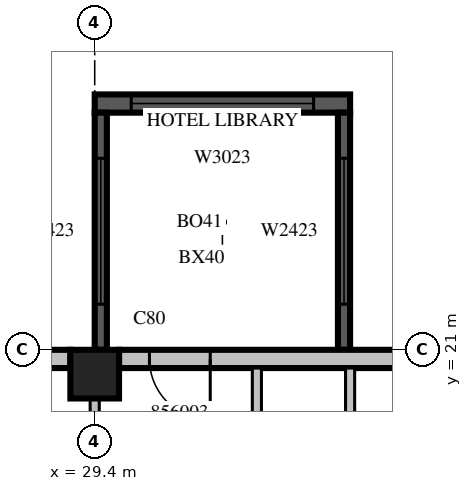
"""IFC4 building model, lengths in metres.
Left out: names, types, materials, properties, quantities, classifications, styles, units other than length and angle.
Written with IfcOpenShell. Run it as: python <this file> out.ifc"""

import sys

from ifc_helpers import new_model, si_unit, direction, frame, frame_2d, origin, origin_2d, place, context, subcontext, project, spatial, rectangle, extrude, source, transform, mapped, element, fill, save


model = new_model("IFC4")
c1 = context("Model", 3, precision=1e-05, world=origin(), true_north=direction((0.0, 1.0)))
c2 = subcontext(c1, "Body", "Model", "MODEL_VIEW")
j1 = project(units=[si_unit("LENGTHUNIT", "METRE"), si_unit("PLANEANGLEUNIT", "RADIAN")], contexts=[c1])
p1 = place(None, origin())
s1 = spatial("IfcSite", under=j1, at=p1, CompositionType="ELEMENT")
p2 = place(p1, origin())
s2 = spatial("IfcBuilding", under=s1, at=p2, CompositionType="ELEMENT")
p3 = place(p2, frame((0.0, 0.0, 246.2)))
s3 = spatial("IfcBuildingStorey", under=s2, at=p3, CompositionType="ELEMENT", Elevation=246.2)
m1 = source(origin(), c2, "Body", "SweptSolid", [
    extrude(rectangle(XDim=0.8, YDim=0.8, at=origin_2d()), origin(), (0.0, 0.0, 1.0), 3.8),
])
p4 = place(p3, frame((29.4, 20.6, 0.0), z_axis=(0.0, 0.0, 1.0), x_axis=(1.0, 0.0, 0.0)))
e1 = element("IfcColumn", 1, at=p4, inside=s3, PredefinedType="COLUMN", context=c2, shape_type="MappedRepresentation", body=[
    mapped(m1, transform((0.0, 0.0, 0.0), scale=1.0)),
])
m2 = source(origin(), c2, "Body", "SweptSolid", [
    extrude(rectangle(XDim=4.2, YDim=0.3, at=frame_2d((2.1, 0.0))), origin(), (0.0, 0.0, 1.0), 3.4),
])
p5 = place(p3, frame((33.6, 25.05, 0.0), z_axis=(0.0, 0.0, 1.0), x_axis=(-1.0, 0.0, 0.0)))
e2 = element("IfcWall", 2, at=p5, inside=s3, PredefinedType="SOLIDWALL", context=c2, shape_type="MappedRepresentation", body=[
    mapped(m2, transform((0.0, 0.0, 0.0), scale=1.0)),
])
m3 = source(origin(), c2, "Body", "SweptSolid", [
    extrude(rectangle(XDim=3.0, YDim=2.3, at=frame_2d((1.5, 1.15))), frame((0.0, 0.16, 0.0), z_axis=(0.0, -1.0, 0.0), x_axis=(1.0, 0.0, 0.0)), (0.0, 0.0, 1.0), 0.32),
])
p6 = place(p5, frame((0.6, 0.0, 0.6)))
e3 = element("IfcOpeningElement", 3, at=p6, cuts=e2, PredefinedType="OPENING", context=c2, shape_type="MappedRepresentation", body=[
    mapped(m3, transform((0.0, 0.0, 0.0), scale=1.0)),
])
m4 = source(origin(), c2, "Body", "SweptSolid", [
    extrude(rectangle(XDim=3.9, YDim=0.2, at=frame_2d((1.95, 0.0))), origin(), (0.0, 0.0, 1.0), 3.4),
])
p7 = place(p3, frame((33.5, 21.0, 0.0), z_axis=(0.0, 0.0, 1.0), x_axis=(0.0, 1.0, 0.0)))
e4 = element("IfcWall", 4, at=p7, inside=s3, PredefinedType="SOLIDWALL", context=c2, shape_type="MappedRepresentation", body=[
    mapped(m4, transform((0.0, 0.0, 0.0), scale=1.0)),
])
m5 = source(origin(), c2, "Body", "SweptSolid", [
    extrude(rectangle(XDim=2.4, YDim=2.3, at=frame_2d((1.2, 1.15))), frame((0.0, 0.11, 0.0), z_axis=(0.0, -1.0, 0.0), x_axis=(1.0, 0.0, 0.0)), (0.0, 0.0, 1.0), 0.22),
])
p8 = place(p7, frame((0.75, 0.0, 0.6)))
e5 = element("IfcOpeningElement", 5, at=p8, cuts=e4, PredefinedType="OPENING", context=c2, shape_type="MappedRepresentation", body=[
    mapped(m5, transform((0.0, 0.0, 0.0), scale=1.0)),
])
p9 = place(p3, frame((29.5, 21.0, 0.0), z_axis=(0.0, 0.0, 1.0), x_axis=(0.0, 1.0, 0.0)))
e6 = element("IfcWall", 6, at=p9, inside=s3, PredefinedType="SOLIDWALL", context=c2, shape_type="MappedRepresentation", body=[
    mapped(m4, transform((0.0, 0.0, 0.0), scale=1.0)),
])
p10 = place(p9, frame((0.75, 0.0, 0.6)))
e7 = element("IfcOpeningElement", 7, at=p10, cuts=e6, PredefinedType="OPENING", context=c2, shape_type="MappedRepresentation", body=[
    mapped(m5, transform((0.0, 0.0, 0.0), scale=1.0)),
])
m6 = source(origin(), c2, "Body", "SweptSolid", [
    extrude(rectangle(XDim=7.2, YDim=0.3, at=frame_2d((3.6, 0.0))), origin(), (0.0, 0.0, 1.0), 3.4),
])
p11 = place(p3, frame((37.0, 20.85, 0.0), z_axis=(0.0, 0.0, 1.0), x_axis=(-1.0, 0.0, 0.0)))
e8 = element("IfcWall", 8, at=p11, inside=s3, PredefinedType="STANDARD", context=c2, shape_type="MappedRepresentation", body=[
    mapped(m6, transform((0.0, 0.0, 0.0), scale=1.0)),
])
m7 = source(origin(), c2, "Body", "SweptSolid", [
    extrude(rectangle(XDim=1.8, YDim=2.3, at=frame_2d((0.9, 1.15))), frame((0.0, 0.16, 0.0), z_axis=(0.0, -1.0, 0.0), x_axis=(1.0, 0.0, 0.0)), (0.0, 0.0, 1.0), 0.32),
])
p12 = place(p11, frame((0.4, 0.0, 0.6)))
e9 = element("IfcOpeningElement", 9, at=p12, cuts=e8, PredefinedType="OPENING", context=c2, shape_type="MappedRepresentation", body=[
    mapped(m7, transform((0.0, 0.0, 0.0), scale=1.0)),
])
m8 = source(origin(), c2, "Body", "SweptSolid", [
    extrude(rectangle(XDim=1.0, YDim=2.1, at=frame_2d((0.5, 1.05))), frame((0.0, 0.16, 0.0), z_axis=(0.0, -1.0, 0.0), x_axis=(1.0, 0.0, 0.0)), (0.0, 0.0, 1.0), 0.32),
])
p13 = place(p11, frame((5.7, 0.0, 0.0)))
e10 = element("IfcOpeningElement", 10, at=p13, cuts=e8, PredefinedType="OPENING", context=c2, shape_type="MappedRepresentation", body=[
    mapped(m8, transform((0.0, 0.0, 0.0), scale=1.0)),
])
p14 = place(p3, frame((29.0, 20.85, 0.0), z_axis=(0.0, 0.0, 1.0), x_axis=(-1.0, 0.0, 0.0)))
e11 = element("IfcWall", 11, at=p14, inside=s3, PredefinedType="STANDARD", context=c2, shape_type="MappedRepresentation", body=[
    mapped(m6, transform((0.0, 0.0, 0.0), scale=1.0)),
])
p15 = place(p14, frame((0.613, 0.0, 0.6)))
e12 = element("IfcOpeningElement", 12, at=p15, cuts=e11, PredefinedType="OPENING", context=c2, shape_type="MappedRepresentation", body=[
    mapped(m7, transform((0.0, 0.0, 0.0), scale=1.0)),
])
p16 = place(p14, frame((5.0, 0.0, 0.6)))
e13 = element("IfcOpeningElement", 13, at=p16, cuts=e11, PredefinedType="OPENING", context=c2, shape_type="MappedRepresentation", body=[
    mapped(m7, transform((0.0, 0.0, 0.0), scale=1.0)),
])
m9 = source(origin(), c2, "Body", "SweptSolid", [
    extrude(rectangle(XDim=3.101, YDim=0.15, at=frame_2d((1.55, 0.0))), origin(), (0.0, 0.0, 1.0), 3.4),
])
p17 = place(p3, frame((29.4, 17.1, 0.0), z_axis=(0.0, 0.0, 1.0), x_axis=(0.0, 1.0, 0.0)))
e14 = element("IfcWall", 14, at=p17, inside=s3, PredefinedType="PARTITIONING", context=c2, shape_type="MappedRepresentation", body=[
    mapped(m9, transform((0.0, 0.0, 0.0), scale=1.0)),
])
m10 = source(origin(), c2, "Body", "SweptSolid", [
    extrude(rectangle(XDim=3.6, YDim=0.15, at=frame_2d((1.8, 0.0))), origin(), (0.0, 0.0, 1.0), 3.4),
])
for number, where, z_axis, x_axis in (
    (15, (32.067, 20.7, 0.0), (0.0, 0.0, 1.0), (0.0, -1.0, 0.0)),
    (16, (33.6, 17.1, 0.0), (0.0, 0.0, 1.0), (0.0, 1.0, 0.0)),
):
    element("IfcWall", number, at=place(p3, frame(where, z_axis=z_axis, x_axis=x_axis)), inside=s3, PredefinedType="PARTITIONING", context=c2, shape_type="MappedRepresentation", body=[
        mapped(m10, transform((0.0, 0.0, 0.0), scale=1.0)),
    ])
m11 = source(origin(), c2, "Body", "SweptSolid", [
    extrude(rectangle(XDim=3.0, YDim=2.3, at=frame_2d((1.5, 1.15))), frame((0.0, 0.03, 0.0), z_axis=(0.0, -1.0, 0.0), x_axis=(1.0, 0.0, 0.0)), (0.0, 0.0, 1.0), 0.06),
])
p18 = place(p6, origin())
e17 = element("IfcWindow", 17, at=p18, inside=s3, PartitioningType="SINGLE_PANEL", PredefinedType="WINDOW", context=c2, shape_type="MappedRepresentation", body=[
    mapped(m11, transform((0.0, 0.0, 0.0), scale=1.0)),
])
fill(e3, e17)
m12 = source(origin(), c2, "Body", "SweptSolid", [
    extrude(rectangle(XDim=2.4, YDim=2.3, at=frame_2d((1.2, 1.15))), frame((0.0, 0.03, 0.0), z_axis=(0.0, -1.0, 0.0), x_axis=(1.0, 0.0, 0.0)), (0.0, 0.0, 1.0), 0.06),
])
p19 = place(p8, origin())
e18 = element("IfcWindow", 18, at=p19, inside=s3, PartitioningType="SINGLE_PANEL", PredefinedType="WINDOW", context=c2, shape_type="MappedRepresentation", body=[
    mapped(m12, transform((0.0, 0.0, 0.0), scale=1.0)),
])
fill(e5, e18)
p20 = place(p10, origin())
e19 = element("IfcWindow", 19, at=p20, inside=s3, PartitioningType="SINGLE_PANEL", PredefinedType="WINDOW", context=c2, shape_type="MappedRepresentation", body=[
    mapped(m12, transform((0.0, 0.0, 0.0), scale=1.0)),
])
fill(e7, e19)
m13 = source(origin(), c2, "Body", "SweptSolid", [
    extrude(rectangle(XDim=1.0, YDim=2.1, at=frame_2d((0.5, 1.05))), frame((0.0, 0.025, 0.0), z_axis=(0.0, -1.0, 0.0), x_axis=(1.0, 0.0, 0.0)), (0.0, 0.0, 1.0), 0.05),
])
p21 = place(p13, origin())
e20 = element("IfcDoor", 20, at=p21, inside=s3, OperationType="SINGLE_SWING_LEFT", PredefinedType="DOOR", context=c2, shape_type="MappedRepresentation", body=[
    mapped(m13, transform((0.0, 0.0, 0.0), scale=1.0)),
])
fill(e10, e20)
save(model, sys.argv[1])
